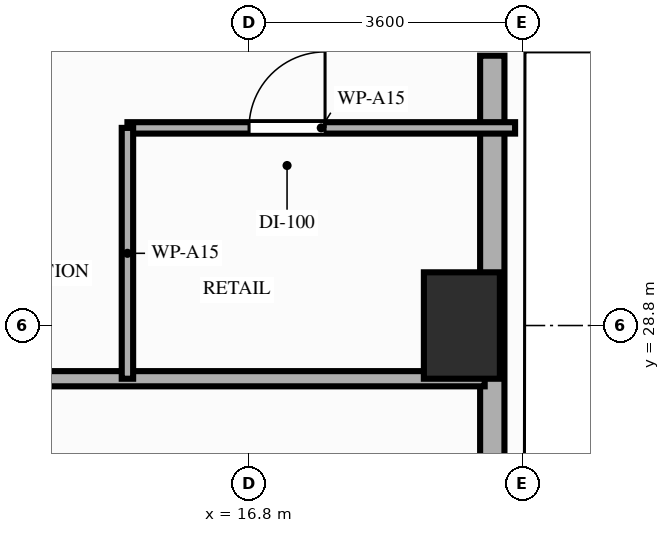
"""IFC4 building model, lengths in metres.
Left out: names, types, materials, properties, quantities, classifications, styles, units other than length and angle.
Written with IfcOpenShell. Run it as: python <this file> out.ifc"""

import sys

from ifc_helpers import new_model, si_unit, direction, frame, frame_2d, origin, origin_2d, place, context, subcontext, project, spatial, rectangle, extrude, element, fill, save


model = new_model("IFC4")
c1 = context("Model", 3, precision=1e-05, world=origin(), true_north=direction((0.0, 1.0)))
c2 = subcontext(c1, "Body", "Model", "MODEL_VIEW")
j1 = project(units=[si_unit("LENGTHUNIT", "METRE"), si_unit("PLANEANGLEUNIT", "RADIAN")], contexts=[c1])
p1 = place(None, origin())
s1 = spatial("IfcSite", under=j1, at=p1, CompositionType="ELEMENT")
p2 = place(p1, origin())
s2 = spatial("IfcBuilding", under=s1, at=p2, CompositionType="ELEMENT")
p3 = place(p2, frame((0.0, 0.0, 36.6)))
s3 = spatial("IfcBuildingStorey", under=s2, at=p3, CompositionType="ELEMENT", Elevation=36.6)
p4 = place(p3, frame((19.6, 28.8, 0.0), z_axis=(0.0, 0.0, 1.0), x_axis=(1.0, 0.0, 0.0)))
e1 = element("IfcColumn", 1, at=p4, inside=s3, PredefinedType="COLUMN", context=c2, shape_type="SweptSolid", body=[
    extrude(rectangle(XDim=1.0, YDim=1.4, at=origin_2d()), origin(), (0.0, 0.0, 1.0), 3.2),
])
p5 = place(p3, frame((20.0, 8.8, 0.0), z_axis=(0.0, 0.0, 1.0), x_axis=(0.0, 1.0, 0.0)))
e2 = element("IfcWall", 2, at=p5, inside=s3, PredefinedType="STANDARD", context=c2, shape_type="SweptSolid", body=[
    extrude(rectangle(XDim=23.55, YDim=0.32, at=frame_2d((11.775, 0.0))), origin(), (0.0, 0.0, 1.0), 2.35),
])
p6 = place(p5, frame((10.7, 0.0, 0.85)))
e3 = element("IfcOpeningElement", 3, at=p6, cuts=e2, PredefinedType="OPENING", context=c2, shape_type="SweptSolid", body=[
    extrude(rectangle(XDim=2.4, YDim=1.25, at=frame_2d((1.2, 0.625))), frame((0.0, 0.17, 0.0), z_axis=(0.0, -1.0, 0.0), x_axis=(1.0, 0.0, 0.0)), (0.0, 0.0, 1.0), 0.34),
])
p7 = place(p3, frame((10.93, 28.1, 0.0), z_axis=(0.0, 0.0, 1.0), x_axis=(1.0, 0.0, 0.0)))
e4 = element("IfcWall", 4, at=p7, inside=s3, PredefinedType="PARTITIONING", context=c2, shape_type="SweptSolid", body=[
    extrude(rectangle(XDim=8.97, YDim=0.2, at=frame_2d((4.485, 0.0))), origin(), (0.0, 0.0, 1.0), 2.35),
])
p8 = place(p3, frame((15.2, 31.4, 0.0), z_axis=(0.0, 0.0, 1.0), x_axis=(1.0, 0.0, 0.0)))
e5 = element("IfcWall", 5, at=p8, inside=s3, PredefinedType="PARTITIONING", context=c2, shape_type="SweptSolid", body=[
    extrude(rectangle(XDim=5.1, YDim=0.15, at=frame_2d((2.55, 0.0))), origin(), (0.0, 0.0, 1.0), 2.35),
])
p9 = place(p8, frame((1.6, 0.0, 0.0)))
e6 = element("IfcOpeningElement", 6, at=p9, cuts=e5, PredefinedType="OPENING", context=c2, shape_type="SweptSolid", body=[
    extrude(rectangle(XDim=1.0, YDim=2.15, at=frame_2d((0.5, 1.075))), frame((0.0, 0.085, 0.0), z_axis=(0.0, -1.0, 0.0), x_axis=(1.0, 0.0, 0.0)), (0.0, 0.0, 1.0), 0.17),
])
p10 = place(p3, frame((15.2, 28.1, 0.0), z_axis=(0.0, 0.0, 1.0), x_axis=(0.0, 1.0, 0.0)))
e7 = element("IfcWall", 7, at=p10, inside=s3, PredefinedType="PARTITIONING", context=c2, shape_type="SweptSolid", body=[
    extrude(rectangle(XDim=3.3, YDim=0.15, at=frame_2d((1.65, 0.0))), origin(), (0.0, 0.0, 1.0), 2.35),
])
p11 = place(p9, origin())
e8 = element("IfcDoor", 8, at=p11, inside=s3, OperationType="SINGLE_SWING_RIGHT", PredefinedType="DOOR", context=c2, shape_type="SweptSolid", body=[
    extrude(rectangle(XDim=1.0, YDim=2.15, at=frame_2d((0.5, 1.075))), frame((0.0, 0.025, 0.0), z_axis=(0.0, -1.0, 0.0), x_axis=(1.0, 0.0, 0.0)), (0.0, 0.0, 1.0), 0.05),
])
fill(e6, e8)
save(model, sys.argv[1])
